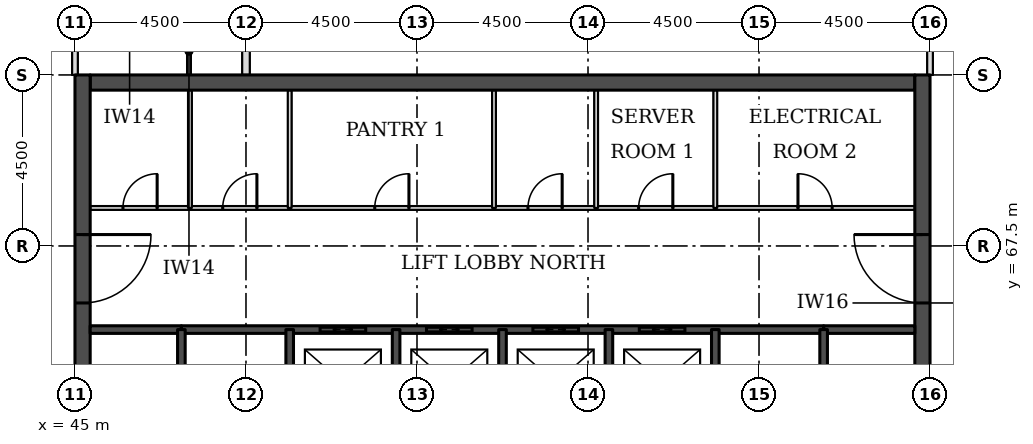
"""IFC4 building model, lengths in metres.
Left out: names, types, materials, properties, quantities, classifications, styles, units other than length and angle.
Written with IfcOpenShell. Run it as: python <this file> out.ifc"""

import sys

from ifc_helpers import new_model, si_unit, direction, frame, frame_2d, origin, place, context, subcontext, project, spatial, rectangle, extrude, element, fill, save


model = new_model("IFC4")
c1 = context("Model", 3, precision=1e-05, world=origin(), true_north=direction((0.0, 1.0)))
c2 = subcontext(c1, "Body", "Model", "MODEL_VIEW")
j1 = project(units=[si_unit("LENGTHUNIT", "METRE"), si_unit("PLANEANGLEUNIT", "RADIAN")], contexts=[c1])
p1 = place(None, origin())
s1 = spatial("IfcSite", under=j1, at=p1, CompositionType="ELEMENT")
p2 = place(p1, origin())
s2 = spatial("IfcBuilding", under=s1, at=p2, CompositionType="ELEMENT")
p3 = place(p2, frame((0.0, 0.0, 188.4)))
s3 = spatial("IfcBuildingStorey", under=s2, at=p3, CompositionType="ELEMENT", Elevation=188.4)
p4 = place(p3, frame((45.4, 71.8, 0.0), z_axis=(0.0, 0.0, 1.0), x_axis=(1.0, 0.0, 0.0)))
e1 = element("IfcWall", 1, at=p4, inside=s3, PredefinedType="SHEAR", context=c2, shape_type="SweptSolid", body=[
    extrude(rectangle(XDim=21.7, YDim=0.4, at=frame_2d((10.85, 0.0))), origin(), (0.0, 0.0, 1.0), 3.7),
])
p5 = place(p3, frame((45.2, 49.5, 0.0), z_axis=(0.0, 0.0, 1.0), x_axis=(0.0, 1.0, 0.0)))
e2 = element("IfcWall", 2, at=p5, inside=s3, PredefinedType="SHEAR", context=c2, shape_type="SweptSolid", body=[
    extrude(rectangle(XDim=22.5, YDim=0.4, at=frame_2d((11.25, 0.0))), origin(), (0.0, 0.0, 1.0), 3.7),
])
p6 = place(p5, frame((4.2, 0.0, 0.0)))
e3 = element("IfcOpeningElement", 3, at=p6, cuts=e2, PredefinedType="OPENING", context=c2, shape_type="SweptSolid", body=[
    extrude(rectangle(XDim=1.8, YDim=2.1, at=frame_2d((0.9, 1.05))), frame((0.0, 0.21, 0.0), z_axis=(0.0, -1.0, 0.0), x_axis=(1.0, 0.0, 0.0)), (0.0, 0.0, 1.0), 0.42),
])
p7 = place(p5, frame((6.9, 0.0, 0.0)))
e4 = element("IfcOpeningElement", 4, at=p7, cuts=e2, PredefinedType="OPENING", context=c2, shape_type="SweptSolid", body=[
    extrude(rectangle(XDim=1.1, YDim=2.1, at=frame_2d((0.55, 1.05))), frame((0.0, 0.21, 0.0), z_axis=(0.0, -1.0, 0.0), x_axis=(1.0, 0.0, 0.0)), (0.0, 0.0, 1.0), 0.42),
])
p8 = place(p5, frame((13.6, 0.0, 0.0)))
e5 = element("IfcOpeningElement", 5, at=p8, cuts=e2, PredefinedType="OPENING", context=c2, shape_type="SweptSolid", body=[
    extrude(rectangle(XDim=1.1, YDim=2.1, at=frame_2d((0.55, 1.05))), frame((0.0, 0.21, 0.0), z_axis=(0.0, -1.0, 0.0), x_axis=(1.0, 0.0, 0.0)), (0.0, 0.0, 1.0), 0.42),
])
p9 = place(p5, frame((16.5, 0.0, 0.0)))
e6 = element("IfcOpeningElement", 6, at=p9, cuts=e2, PredefinedType="OPENING", context=c2, shape_type="SweptSolid", body=[
    extrude(rectangle(XDim=1.8, YDim=2.1, at=frame_2d((0.9, 1.05))), frame((0.0, 0.21, 0.0), z_axis=(0.0, -1.0, 0.0), x_axis=(1.0, 0.0, 0.0)), (0.0, 0.0, 1.0), 0.42),
])
p10 = place(p3, frame((67.3, 49.5, 0.0), z_axis=(0.0, 0.0, 1.0), x_axis=(0.0, 1.0, 0.0)))
e7 = element("IfcWall", 7, at=p10, inside=s3, PredefinedType="SHEAR", context=c2, shape_type="SweptSolid", body=[
    extrude(rectangle(XDim=22.5, YDim=0.4, at=frame_2d((11.25, 0.0))), origin(), (0.0, 0.0, 1.0), 3.7),
])
p11 = place(p10, frame((4.2, 0.0, 0.0)))
e8 = element("IfcOpeningElement", 8, at=p11, cuts=e7, PredefinedType="OPENING", context=c2, shape_type="SweptSolid", body=[
    extrude(rectangle(XDim=1.8, YDim=2.1, at=frame_2d((0.9, 1.05))), frame((0.0, 0.21, 0.0), z_axis=(0.0, -1.0, 0.0), x_axis=(1.0, 0.0, 0.0)), (0.0, 0.0, 1.0), 0.42),
])
p12 = place(p10, frame((6.9, 0.0, 0.0)))
e9 = element("IfcOpeningElement", 9, at=p12, cuts=e7, PredefinedType="OPENING", context=c2, shape_type="SweptSolid", body=[
    extrude(rectangle(XDim=1.1, YDim=2.1, at=frame_2d((0.55, 1.05))), frame((0.0, 0.21, 0.0), z_axis=(0.0, -1.0, 0.0), x_axis=(1.0, 0.0, 0.0)), (0.0, 0.0, 1.0), 0.42),
])
p13 = place(p10, frame((13.6, 0.0, 0.0)))
e10 = element("IfcOpeningElement", 10, at=p13, cuts=e7, PredefinedType="OPENING", context=c2, shape_type="SweptSolid", body=[
    extrude(rectangle(XDim=1.1, YDim=2.1, at=frame_2d((0.55, 1.05))), frame((0.0, 0.21, 0.0), z_axis=(0.0, -1.0, 0.0), x_axis=(1.0, 0.0, 0.0)), (0.0, 0.0, 1.0), 0.42),
])
p14 = place(p10, frame((16.5, 0.0, 0.0)))
e11 = element("IfcOpeningElement", 11, at=p14, cuts=e7, PredefinedType="OPENING", context=c2, shape_type="SweptSolid", body=[
    extrude(rectangle(XDim=1.8, YDim=2.1, at=frame_2d((0.9, 1.05))), frame((0.0, 0.21, 0.0), z_axis=(0.0, -1.0, 0.0), x_axis=(1.0, 0.0, 0.0)), (0.0, 0.0, 1.0), 0.42),
])
p15 = place(p3, frame((45.0, 72.0, 0.0), z_axis=(0.0, 0.0, 1.0), x_axis=(0.0, 1.0, 0.0)))
e12 = element("IfcWall", 12, at=p15, inside=s3, PredefinedType="PARTITIONING", context=c2, shape_type="SweptSolid", body=[
    extrude(rectangle(XDim=4.5, YDim=0.15, at=frame_2d((2.25, 0.0))), origin(), (0.0, 0.0, 1.0), 3.022),
])
p16 = place(p15, frame((1.75, 0.0, 0.0)))
e13 = element("IfcOpeningElement", 13, at=p16, cuts=e12, PredefinedType="OPENING", context=c2, shape_type="SweptSolid", body=[
    extrude(rectangle(XDim=1.0, YDim=2.1, at=frame_2d((0.5, 1.05))), frame((0.0, 0.085, 0.0), z_axis=(0.0, -1.0, 0.0), x_axis=(1.0, 0.0, 0.0)), (0.0, 0.0, 1.0), 0.17),
])
p17 = place(p3, frame((48.0, 72.0, 0.0), z_axis=(0.0, 0.0, 1.0), x_axis=(0.0, 1.0, 0.0)))
e14 = element("IfcWall", 14, at=p17, inside=s3, PredefinedType="PARTITIONING", context=c2, shape_type="SweptSolid", body=[
    extrude(rectangle(XDim=4.45, YDim=0.1, at=frame_2d((2.225, 0.0))), origin(), (0.0, 0.0, 1.0), 3.55),
])
p18 = place(p3, frame((49.5, 72.0, 0.0), z_axis=(0.0, 0.0, 1.0), x_axis=(0.0, 1.0, 0.0)))
e15 = element("IfcWall", 15, at=p18, inside=s3, PredefinedType="PARTITIONING", context=c2, shape_type="SweptSolid", body=[
    extrude(rectangle(XDim=3.0, YDim=0.2, at=frame_2d((1.5, 0.0))), origin(), (0.0, 0.0, 1.0), 3.55),
])
p19 = place(p3, frame((67.5, 72.0, 0.0), z_axis=(0.0, 0.0, 1.0), x_axis=(0.0, 1.0, 0.0)))
e16 = element("IfcWall", 16, at=p19, inside=s3, PredefinedType="PARTITIONING", context=c2, shape_type="SweptSolid", body=[
    extrude(rectangle(XDim=3.0, YDim=0.15, at=frame_2d((1.5, 0.0))), origin(), (0.0, 0.0, 1.0), 3.022),
])
for number, where, z_axis, x_axis in (
    (17, (45.4, 65.3, 0.0), (0.0, 0.0, 1.0), (1.0, 0.0, 0.0)),
    (18, (64.7, 65.3, 0.0), (0.0, 0.0, 1.0), (1.0, 0.0, 0.0)),
):
    element("IfcWall", number, at=place(p3, frame(where, z_axis=z_axis, x_axis=x_axis)), inside=s3, PredefinedType="SOLIDWALL", context=c2, shape_type="SweptSolid", body=[
        extrude(rectangle(XDim=2.4, YDim=0.2, at=frame_2d((1.2, 0.0))), origin(), (0.0, 0.0, 1.0), 3.55),
    ])
p20 = place(p3, frame((47.8, 65.3, 0.0), z_axis=(0.0, 0.0, 1.0), x_axis=(1.0, 0.0, 0.0)))
e19 = element("IfcWall", 19, at=p20, inside=s3, PredefinedType="SOLIDWALL", context=c2, shape_type="SweptSolid", body=[
    extrude(rectangle(XDim=16.9, YDim=0.2, at=frame_2d((8.45, 0.0))), origin(), (0.0, 0.0, 1.0), 3.55),
])
p21 = place(p20, frame((3.65, 0.0, 0.0)))
e20 = element("IfcOpeningElement", 20, at=p21, cuts=e19, PredefinedType="OPENING", context=c2, shape_type="SweptSolid", body=[
    extrude(rectangle(XDim=1.2, YDim=2.1, at=frame_2d((0.6, 1.05))), frame((0.0, 0.11, 0.0), z_axis=(0.0, -1.0, 0.0), x_axis=(1.0, 0.0, 0.0)), (0.0, 0.0, 1.0), 0.22),
])
p22 = place(p20, frame((6.45, 0.0, 0.0)))
e21 = element("IfcOpeningElement", 21, at=p22, cuts=e19, PredefinedType="OPENING", context=c2, shape_type="SweptSolid", body=[
    extrude(rectangle(XDim=1.2, YDim=2.1, at=frame_2d((0.6, 1.05))), frame((0.0, 0.11, 0.0), z_axis=(0.0, -1.0, 0.0), x_axis=(1.0, 0.0, 0.0)), (0.0, 0.0, 1.0), 0.22),
])
p23 = place(p20, frame((9.25, 0.0, 0.0)))
e22 = element("IfcOpeningElement", 22, at=p23, cuts=e19, PredefinedType="OPENING", context=c2, shape_type="SweptSolid", body=[
    extrude(rectangle(XDim=1.2, YDim=2.1, at=frame_2d((0.6, 1.05))), frame((0.0, 0.11, 0.0), z_axis=(0.0, -1.0, 0.0), x_axis=(1.0, 0.0, 0.0)), (0.0, 0.0, 1.0), 0.22),
])
p24 = place(p20, frame((12.05, 0.0, 0.0)))
e23 = element("IfcOpeningElement", 23, at=p24, cuts=e19, PredefinedType="OPENING", context=c2, shape_type="SweptSolid", body=[
    extrude(rectangle(XDim=1.2, YDim=2.1, at=frame_2d((0.6, 1.05))), frame((0.0, 0.11, 0.0), z_axis=(0.0, -1.0, 0.0), x_axis=(1.0, 0.0, 0.0)), (0.0, 0.0, 1.0), 0.22),
])
p25 = place(p3, frame((45.4, 68.5, 0.0), z_axis=(0.0, 0.0, 1.0), x_axis=(1.0, 0.0, 0.0)))
e24 = element("IfcWall", 24, at=p25, inside=s3, PredefinedType="PARTITIONING", context=c2, shape_type="SweptSolid", body=[
    extrude(rectangle(XDim=21.7, YDim=0.1, at=frame_2d((10.85, 0.0))), origin(), (0.0, 0.0, 1.0), 3.55),
])
p26 = place(p25, frame((18.625, 0.0, 0.0)))
e25 = element("IfcOpeningElement", 25, at=p26, cuts=e24, PredefinedType="OPENING", context=c2, shape_type="SweptSolid", body=[
    extrude(rectangle(XDim=0.9, YDim=2.1, at=frame_2d((0.45, 1.05))), frame((0.0, 0.06, 0.0), z_axis=(0.0, -1.0, 0.0), x_axis=(1.0, 0.0, 0.0)), (0.0, 0.0, 1.0), 0.12),
])
p27 = place(p25, frame((0.863, 0.0, 0.0)))
e26 = element("IfcOpeningElement", 26, at=p27, cuts=e24, PredefinedType="OPENING", context=c2, shape_type="SweptSolid", body=[
    extrude(rectangle(XDim=0.9, YDim=2.1, at=frame_2d((0.45, 1.05))), frame((0.0, 0.06, 0.0), z_axis=(0.0, -1.0, 0.0), x_axis=(1.0, 0.0, 0.0)), (0.0, 0.0, 1.0), 0.12),
])
p28 = place(p25, frame((3.488, 0.0, 0.0)))
e27 = element("IfcOpeningElement", 27, at=p28, cuts=e24, PredefinedType="OPENING", context=c2, shape_type="SweptSolid", body=[
    extrude(rectangle(XDim=0.9, YDim=2.1, at=frame_2d((0.45, 1.05))), frame((0.0, 0.06, 0.0), z_axis=(0.0, -1.0, 0.0), x_axis=(1.0, 0.0, 0.0)), (0.0, 0.0, 1.0), 0.12),
])
p29 = place(p25, frame((14.432, 0.0, 0.0)))
e28 = element("IfcOpeningElement", 28, at=p29, cuts=e24, PredefinedType="OPENING", context=c2, shape_type="SweptSolid", body=[
    extrude(rectangle(XDim=0.9, YDim=2.1, at=frame_2d((0.45, 1.05))), frame((0.0, 0.06, 0.0), z_axis=(0.0, -1.0, 0.0), x_axis=(1.0, 0.0, 0.0)), (0.0, 0.0, 1.0), 0.12),
])
p30 = place(p25, frame((11.52, 0.0, 0.0)))
e29 = element("IfcOpeningElement", 29, at=p30, cuts=e24, PredefinedType="OPENING", context=c2, shape_type="SweptSolid", body=[
    extrude(rectangle(XDim=0.9, YDim=2.1, at=frame_2d((0.45, 1.05))), frame((0.0, 0.06, 0.0), z_axis=(0.0, -1.0, 0.0), x_axis=(1.0, 0.0, 0.0)), (0.0, 0.0, 1.0), 0.12),
])
p31 = place(p25, frame((7.488, 0.0, 0.0)))
e30 = element("IfcOpeningElement", 30, at=p31, cuts=e24, PredefinedType="OPENING", context=c2, shape_type="SweptSolid", body=[
    extrude(rectangle(XDim=0.9, YDim=2.1, at=frame_2d((0.45, 1.05))), frame((0.0, 0.06, 0.0), z_axis=(0.0, -1.0, 0.0), x_axis=(1.0, 0.0, 0.0)), (0.0, 0.0, 1.0), 0.12),
])
p32 = place(p3, frame((47.8, 62.0, 0.0), z_axis=(0.0, 0.0, 1.0), x_axis=(0.0, 1.0, 0.0)))
e31 = element("IfcWall", 31, at=p32, inside=s3, PredefinedType="SOLIDWALL", context=c2, shape_type="SweptSolid", body=[
    extrude(rectangle(XDim=3.3, YDim=0.2, at=frame_2d((1.65, 0.0))), origin(), (0.0, 0.0, 1.0), 3.55),
])
p33 = place(p32, frame((1.1, 0.0, 0.0)))
e32 = element("IfcOpeningElement", 32, at=p33, cuts=e31, PredefinedType="OPENING", context=c2, shape_type="SweptSolid", body=[
    extrude(rectangle(XDim=1.1, YDim=2.1, at=frame_2d((0.55, 1.05))), frame((0.0, 0.11, 0.0), z_axis=(0.0, -1.0, 0.0), x_axis=(1.0, 0.0, 0.0)), (0.0, 0.0, 1.0), 0.22),
])
for number, where, z_axis, x_axis in (
    (33, (48.025, 68.5, 0.0), (0.0, 0.0, 1.0), (0.0, 1.0, 0.0)),
    (34, (50.65, 68.5, 0.0), (0.0, 0.0, 1.0), (0.0, 1.0, 0.0)),
):
    element("IfcWall", number, at=place(p3, frame(where, z_axis=z_axis, x_axis=x_axis)), inside=s3, PredefinedType="PARTITIONING", context=c2, shape_type="SweptSolid", body=[
        extrude(rectangle(XDim=3.1, YDim=0.1, at=frame_2d((1.55, 0.0))), origin(), (0.0, 0.0, 1.0), 3.55),
    ])
p34 = place(p3, frame((50.65, 62.0, 0.0), z_axis=(0.0, 0.0, 1.0), x_axis=(0.0, 1.0, 0.0)))
e35 = element("IfcWall", 35, at=p34, inside=s3, PredefinedType="SOLIDWALL", context=c2, shape_type="SweptSolid", body=[
    extrude(rectangle(XDim=3.3, YDim=0.2, at=frame_2d((1.65, 0.0))), origin(), (0.0, 0.0, 1.0), 3.55),
])
p35 = place(p3, frame((53.45, 62.5, 0.0), z_axis=(0.0, 0.0, 1.0), x_axis=(0.0, 1.0, 0.0)))
e36 = element("IfcWall", 36, at=p35, inside=s3, PredefinedType="SOLIDWALL", context=c2, shape_type="SweptSolid", body=[
    extrude(rectangle(XDim=2.8, YDim=0.2, at=frame_2d((1.4, 0.0))), origin(), (0.0, 0.0, 1.0), 3.55),
])
p36 = place(p3, frame((56.026, 68.5, 0.0), z_axis=(0.0, 0.0, 1.0), x_axis=(0.0, 1.0, 0.0)))
e37 = element("IfcWall", 37, at=p36, inside=s3, PredefinedType="PARTITIONING", context=c2, shape_type="SweptSolid", body=[
    extrude(rectangle(XDim=3.1, YDim=0.1, at=frame_2d((1.55, 0.0))), origin(), (0.0, 0.0, 1.0), 3.55),
])
p37 = place(p3, frame((56.25, 62.5, 0.0), z_axis=(0.0, 0.0, 1.0), x_axis=(0.0, 1.0, 0.0)))
e38 = element("IfcWall", 38, at=p37, inside=s3, PredefinedType="SOLIDWALL", context=c2, shape_type="SweptSolid", body=[
    extrude(rectangle(XDim=2.8, YDim=0.2, at=frame_2d((1.4, 0.0))), origin(), (0.0, 0.0, 1.0), 3.55),
])
p38 = place(p3, frame((58.714, 68.5, 0.0), z_axis=(0.0, 0.0, 1.0), x_axis=(0.0, 1.0, 0.0)))
e39 = element("IfcWall", 39, at=p38, inside=s3, PredefinedType="PARTITIONING", context=c2, shape_type="SweptSolid", body=[
    extrude(rectangle(XDim=3.1, YDim=0.1, at=frame_2d((1.55, 0.0))), origin(), (0.0, 0.0, 1.0), 3.55),
])
p39 = place(p3, frame((59.05, 62.5, 0.0), z_axis=(0.0, 0.0, 1.0), x_axis=(0.0, 1.0, 0.0)))
e40 = element("IfcWall", 40, at=p39, inside=s3, PredefinedType="SOLIDWALL", context=c2, shape_type="SweptSolid", body=[
    extrude(rectangle(XDim=2.8, YDim=0.2, at=frame_2d((1.4, 0.0))), origin(), (0.0, 0.0, 1.0), 3.55),
])
p40 = place(p3, frame((61.85, 68.5, 0.0), z_axis=(0.0, 0.0, 1.0), x_axis=(0.0, 1.0, 0.0)))
e41 = element("IfcWall", 41, at=p40, inside=s3, PredefinedType="PARTITIONING", context=c2, shape_type="SweptSolid", body=[
    extrude(rectangle(XDim=3.1, YDim=0.1, at=frame_2d((1.55, 0.0))), origin(), (0.0, 0.0, 1.0), 3.55),
])
p41 = place(p3, frame((61.85, 62.0, 0.0), z_axis=(0.0, 0.0, 1.0), x_axis=(0.0, 1.0, 0.0)))
e42 = element("IfcWall", 42, at=p41, inside=s3, PredefinedType="SOLIDWALL", context=c2, shape_type="SweptSolid", body=[
    extrude(rectangle(XDim=3.3, YDim=0.2, at=frame_2d((1.65, 0.0))), origin(), (0.0, 0.0, 1.0), 3.55),
])
p42 = place(p3, frame((64.7, 62.0, 0.0), z_axis=(0.0, 0.0, 1.0), x_axis=(0.0, 1.0, 0.0)))
e43 = element("IfcWall", 43, at=p42, inside=s3, PredefinedType="SOLIDWALL", context=c2, shape_type="SweptSolid", body=[
    extrude(rectangle(XDim=3.3, YDim=0.2, at=frame_2d((1.65, 0.0))), origin(), (0.0, 0.0, 1.0), 3.55),
])
p43 = place(p42, frame((1.1, 0.0, 0.0)))
e44 = element("IfcOpeningElement", 44, at=p43, cuts=e43, PredefinedType="OPENING", context=c2, shape_type="SweptSolid", body=[
    extrude(rectangle(XDim=1.1, YDim=2.1, at=frame_2d((0.55, 1.05))), frame((0.0, 0.11, 0.0), z_axis=(0.0, -1.0, 0.0), x_axis=(1.0, 0.0, 0.0)), (0.0, 0.0, 1.0), 0.22),
])
p44 = place(p21, origin())
e45 = element("IfcDoor", 45, at=p44, inside=s3, OperationType="DOUBLE_DOOR_SLIDING", PredefinedType="DOOR", context=c2, shape_type="SweptSolid", body=[
    extrude(rectangle(XDim=1.2, YDim=2.1, at=frame_2d((0.6, 1.05))), frame((0.0, 0.025, 0.0), z_axis=(0.0, -1.0, 0.0), x_axis=(1.0, 0.0, 0.0)), (0.0, 0.0, 1.0), 0.05),
])
fill(e20, e45)
p45 = place(p22, origin())
e46 = element("IfcDoor", 46, at=p45, inside=s3, OperationType="DOUBLE_DOOR_SLIDING", PredefinedType="DOOR", context=c2, shape_type="SweptSolid", body=[
    extrude(rectangle(XDim=1.2, YDim=2.1, at=frame_2d((0.6, 1.05))), frame((0.0, 0.025, 0.0), z_axis=(0.0, -1.0, 0.0), x_axis=(1.0, 0.0, 0.0)), (0.0, 0.0, 1.0), 0.05),
])
fill(e21, e46)
p46 = place(p23, origin())
e47 = element("IfcDoor", 47, at=p46, inside=s3, OperationType="DOUBLE_DOOR_SLIDING", PredefinedType="DOOR", context=c2, shape_type="SweptSolid", body=[
    extrude(rectangle(XDim=1.2, YDim=2.1, at=frame_2d((0.6, 1.05))), frame((0.0, 0.025, 0.0), z_axis=(0.0, -1.0, 0.0), x_axis=(1.0, 0.0, 0.0)), (0.0, 0.0, 1.0), 0.05),
])
fill(e22, e47)
p47 = place(p24, origin())
e48 = element("IfcDoor", 48, at=p47, inside=s3, OperationType="DOUBLE_DOOR_SLIDING", PredefinedType="DOOR", context=c2, shape_type="SweptSolid", body=[
    extrude(rectangle(XDim=1.2, YDim=2.1, at=frame_2d((0.6, 1.05))), frame((0.0, 0.025, 0.0), z_axis=(0.0, -1.0, 0.0), x_axis=(1.0, 0.0, 0.0)), (0.0, 0.0, 1.0), 0.05),
])
fill(e23, e48)
p48 = place(p9, frame((1.8, 0.0, 0.0), z_axis=(0.0, 0.0, 1.0), x_axis=(-1.0, 0.0, 0.0)))
e49 = element("IfcDoor", 49, at=p48, inside=s3, OperationType="SINGLE_SWING_LEFT", PredefinedType="DOOR", context=c2, shape_type="SweptSolid", body=[
    extrude(rectangle(XDim=1.8, YDim=2.1, at=frame_2d((0.9, 1.05))), frame((0.0, 0.025, 0.0), z_axis=(0.0, -1.0, 0.0), x_axis=(1.0, 0.0, 0.0)), (0.0, 0.0, 1.0), 0.05),
])
fill(e6, e49)
p49 = place(p14, origin())
e50 = element("IfcDoor", 50, at=p49, inside=s3, OperationType="SINGLE_SWING_RIGHT", PredefinedType="DOOR", context=c2, shape_type="SweptSolid", body=[
    extrude(rectangle(XDim=1.8, YDim=2.1, at=frame_2d((0.9, 1.05))), frame((0.0, 0.025, 0.0), z_axis=(0.0, -1.0, 0.0), x_axis=(1.0, 0.0, 0.0)), (0.0, 0.0, 1.0), 0.05),
])
fill(e11, e50)
p50 = place(p26, origin())
e51 = element("IfcDoor", 51, at=p50, inside=s3, OperationType="SINGLE_SWING_LEFT", PredefinedType="DOOR", context=c2, shape_type="SweptSolid", body=[
    extrude(rectangle(XDim=0.9, YDim=2.1, at=frame_2d((0.45, 1.05))), frame((0.0, 0.025, 0.0), z_axis=(0.0, -1.0, 0.0), x_axis=(1.0, 0.0, 0.0)), (0.0, 0.0, 1.0), 0.05),
])
fill(e25, e51)
p51 = place(p27, origin())
e52 = element("IfcDoor", 52, at=p51, inside=s3, OperationType="SINGLE_SWING_RIGHT", PredefinedType="DOOR", context=c2, shape_type="SweptSolid", body=[
    extrude(rectangle(XDim=0.9, YDim=2.1, at=frame_2d((0.45, 1.05))), frame((0.0, 0.025, 0.0), z_axis=(0.0, -1.0, 0.0), x_axis=(1.0, 0.0, 0.0)), (0.0, 0.0, 1.0), 0.05),
])
fill(e26, e52)
p52 = place(p28, origin())
e53 = element("IfcDoor", 53, at=p52, inside=s3, OperationType="SINGLE_SWING_RIGHT", PredefinedType="DOOR", context=c2, shape_type="SweptSolid", body=[
    extrude(rectangle(XDim=0.9, YDim=2.1, at=frame_2d((0.45, 1.05))), frame((0.0, 0.025, 0.0), z_axis=(0.0, -1.0, 0.0), x_axis=(1.0, 0.0, 0.0)), (0.0, 0.0, 1.0), 0.05),
])
fill(e27, e53)
p53 = place(p29, origin())
e54 = element("IfcDoor", 54, at=p53, inside=s3, OperationType="SINGLE_SWING_RIGHT", PredefinedType="DOOR", context=c2, shape_type="SweptSolid", body=[
    extrude(rectangle(XDim=0.9, YDim=2.1, at=frame_2d((0.45, 1.05))), frame((0.0, 0.025, 0.0), z_axis=(0.0, -1.0, 0.0), x_axis=(1.0, 0.0, 0.0)), (0.0, 0.0, 1.0), 0.05),
])
fill(e28, e54)
p54 = place(p30, origin())
e55 = element("IfcDoor", 55, at=p54, inside=s3, OperationType="SINGLE_SWING_RIGHT", PredefinedType="DOOR", context=c2, shape_type="SweptSolid", body=[
    extrude(rectangle(XDim=0.9, YDim=2.1, at=frame_2d((0.45, 1.05))), frame((0.0, 0.025, 0.0), z_axis=(0.0, -1.0, 0.0), x_axis=(1.0, 0.0, 0.0)), (0.0, 0.0, 1.0), 0.05),
])
fill(e29, e55)
p55 = place(p31, origin())
e56 = element("IfcDoor", 56, at=p55, inside=s3, OperationType="SINGLE_SWING_RIGHT", PredefinedType="DOOR", context=c2, shape_type="SweptSolid", body=[
    extrude(rectangle(XDim=0.9, YDim=2.1, at=frame_2d((0.45, 1.05))), frame((0.0, 0.025, 0.0), z_axis=(0.0, -1.0, 0.0), x_axis=(1.0, 0.0, 0.0)), (0.0, 0.0, 1.0), 0.05),
])
fill(e30, e56)
save(model, sys.argv[1])
